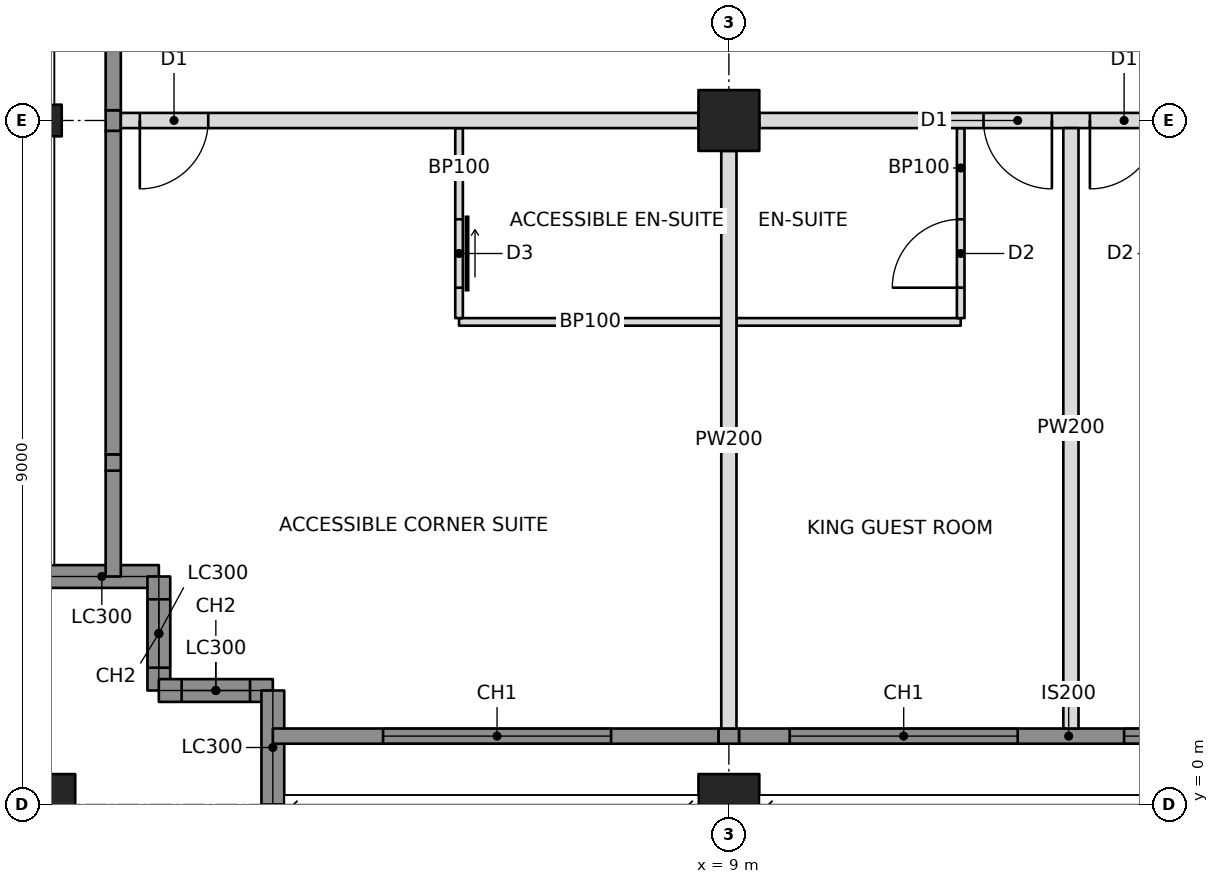
"""IFC4 building model, lengths in metres.
Left out: names, types, materials, properties, quantities, classifications, styles, units other than length and angle.
Written with IfcOpenShell. Run it as: python <this file> out.ifc"""

import sys

from ifc_helpers import new_model, si_unit, direction, frame, frame_2d, origin, origin_with_axes, origin_2d, place, context, subcontext, project, spatial, rectangle, hollow_rectangle, i_section, extrude, element, fill, save


model = new_model("IFC4")
c1 = context("Model", 3, precision=1e-05, world=origin(), true_north=direction((0.0, 1.0)))
c2 = subcontext(c1, "Body", "Model", "MODEL_VIEW")
j1 = project(units=[si_unit("LENGTHUNIT", "METRE"), si_unit("PLANEANGLEUNIT", "RADIAN")], contexts=[c1])
p1 = place(None, origin())
s1 = spatial("IfcSite", under=j1, at=p1, CompositionType="ELEMENT")
p2 = place(p1, origin())
s2 = spatial("IfcBuilding", under=s1, at=p2, CompositionType="ELEMENT")
p3 = place(p2, frame((0.0, 0.0, 255.4)))
s3 = spatial("IfcBuildingStorey", under=s2, at=p3, CompositionType="ELEMENT", Elevation=255.4)
p4 = place(p3, origin_with_axes())
e1 = element("IfcColumn", 1, at=p4, inside=s3, PredefinedType="COLUMN", context=c2, shape_type="SweptSolid", body=[
    extrude(hollow_rectangle(XDim=0.8, YDim=0.8, WallThickness=0.032, at=origin_2d()), origin(), (0.0, 0.0, 1.0), 3.6),
])
p5 = place(p3, frame((0.0, 9.0, 0.0), z_axis=(0.0, 0.0, 1.0), x_axis=(0.0, 1.0, 0.0)))
e2 = element("IfcColumn", 2, at=p5, inside=s3, PredefinedType="COLUMN", context=c2, shape_type="SweptSolid", body=[
    extrude(i_section(OverallWidth=0.417, OverallDepth=0.445, WebThickness=0.039, FlangeThickness=0.063, at=origin_2d()), origin(), (0.0, 0.0, 1.0), 3.6),
])
for number, where, z_axis, x_axis in (
    (3, (9.0, 0.0, 0.0), (0.0, 0.0, 1.0), (1.0, 0.0, 0.0)),
    (4, (9.0, 9.0, 0.0), (0.0, 0.0, 1.0), (1.0, 0.0, 0.0)),
):
    element("IfcColumn", number, at=place(p3, frame(where, z_axis=z_axis, x_axis=x_axis)), inside=s3, PredefinedType="COLUMN", context=c2, shape_type="SweptSolid", body=[
        extrude(hollow_rectangle(XDim=0.8, YDim=0.8, WallThickness=0.032, at=origin_2d()), origin(), (0.0, 0.0, 1.0), 3.6),
    ])
p6 = place(p3, frame((0.0, 3.0, 0.0), z_axis=(0.0, 0.0, 1.0), x_axis=(1.0, 0.0, 0.0)))
e5 = element("IfcWall", 5, at=p6, inside=s3, PredefinedType="SOLIDWALL", context=c2, shape_type="SweptSolid", body=[
    extrude(rectangle(XDim=1.5, YDim=0.3, at=frame_2d((0.75, 0.0))), origin(), (0.0, 0.0, 1.0), 2.62),
])
p7 = place(p3, frame((1.5, 3.0, 0.0), z_axis=(0.0, 0.0, 1.0), x_axis=(0.0, -1.0, 0.0)))
e6 = element("IfcWall", 6, at=p7, inside=s3, PredefinedType="SOLIDWALL", context=c2, shape_type="SweptSolid", body=[
    extrude(rectangle(XDim=1.5, YDim=0.3, at=frame_2d((0.75, 0.0))), origin(), (0.0, 0.0, 1.0), 3.4),
])
p8 = place(p7, frame((0.3, 0.0, 0.6)))
e7 = element("IfcOpeningElement", 7, at=p8, cuts=e6, PredefinedType="OPENING", context=c2, shape_type="SweptSolid", body=[
    extrude(rectangle(XDim=0.9, YDim=2.2, at=frame_2d((0.45, 1.1))), frame((0.0, 0.16, 0.0), z_axis=(0.0, -1.0, 0.0), x_axis=(1.0, 0.0, 0.0)), (0.0, 0.0, 1.0), 0.32),
])
p9 = place(p3, frame((1.5, 1.5, 0.0), z_axis=(0.0, 0.0, 1.0), x_axis=(1.0, 0.0, 0.0)))
e8 = element("IfcWall", 8, at=p9, inside=s3, PredefinedType="SOLIDWALL", context=c2, shape_type="SweptSolid", body=[
    extrude(rectangle(XDim=1.5, YDim=0.3, at=frame_2d((0.75, 0.0))), origin(), (0.0, 0.0, 1.0), 3.4),
])
p10 = place(p9, frame((0.3, 0.0, 0.6)))
e9 = element("IfcOpeningElement", 9, at=p10, cuts=e8, PredefinedType="OPENING", context=c2, shape_type="SweptSolid", body=[
    extrude(rectangle(XDim=0.9, YDim=2.2, at=frame_2d((0.45, 1.1))), frame((0.0, 0.16, 0.0), z_axis=(0.0, -1.0, 0.0), x_axis=(1.0, 0.0, 0.0)), (0.0, 0.0, 1.0), 0.32),
])
p11 = place(p3, frame((3.0, 1.5, 0.0), z_axis=(0.0, 0.0, 1.0), x_axis=(0.0, -1.0, 0.0)))
e10 = element("IfcWall", 10, at=p11, inside=s3, PredefinedType="SOLIDWALL", context=c2, shape_type="SweptSolid", body=[
    extrude(rectangle(XDim=1.5, YDim=0.3, at=frame_2d((0.75, 0.0))), origin(), (0.0, 0.0, 1.0), 2.62),
])
p12 = place(p3, frame((3.0, 0.9, 0.0), z_axis=(0.0, 0.0, 1.0), x_axis=(1.0, 0.0, 0.0)))
e11 = element("IfcWall", 11, at=p12, inside=s3, PredefinedType="SOLIDWALL", context=c2, shape_type="SweptSolid", body=[
    extrude(rectangle(XDim=5.865, YDim=0.2, at=frame_2d((2.932, 0.0))), origin(), (0.0, 0.0, 1.0), 3.4),
])
p13 = place(p12, frame((1.45, 0.0, 0.6)))
e12 = element("IfcOpeningElement", 12, at=p13, cuts=e11, PredefinedType="OPENING", context=c2, shape_type="SweptSolid", body=[
    extrude(rectangle(XDim=3.0, YDim=2.2, at=frame_2d((1.5, 1.1))), frame((0.0, 0.11, 0.0), z_axis=(0.0, -1.0, 0.0), x_axis=(1.0, 0.0, 0.0)), (0.0, 0.0, 1.0), 0.22),
])
p14 = place(p3, frame((0.9, 3.0, 0.0), z_axis=(0.0, 0.0, 1.0), x_axis=(0.0, 1.0, 0.0)))
e13 = element("IfcWall", 13, at=p14, inside=s3, PredefinedType="SOLIDWALL", context=c2, shape_type="SweptSolid", body=[
    extrude(rectangle(XDim=1.393, YDim=0.2, at=frame_2d((0.696, 0.0))), origin(), (0.0, 0.0, 1.0), 3.4),
])
p15 = place(p3, frame((1.0, 9.0, 0.0), z_axis=(0.0, 0.0, 1.0), x_axis=(1.0, 0.0, 0.0)))
e14 = element("IfcWall", 14, at=p15, inside=s3, PredefinedType="PARTITIONING", context=c2, shape_type="SweptSolid", body=[
    extrude(rectangle(XDim=7.6, YDim=0.2, at=frame_2d((3.8, 0.0))), origin(), (0.0, 0.0, 1.0), 2.638),
])
p16 = place(p15, frame((0.25, 0.0, 0.0)))
e15 = element("IfcOpeningElement", 15, at=p16, cuts=e14, PredefinedType="OPENING", context=c2, shape_type="SweptSolid", body=[
    extrude(rectangle(XDim=0.9, YDim=2.1, at=frame_2d((0.45, 1.05))), frame((0.0, 0.11, 0.0), z_axis=(0.0, -1.0, 0.0), x_axis=(1.0, 0.0, 0.0)), (0.0, 0.0, 1.0), 0.22),
])
p17 = place(p3, frame((9.4, 9.0, 0.0), z_axis=(0.0, 0.0, 1.0), x_axis=(1.0, 0.0, 0.0)))
e16 = element("IfcWall", 16, at=p17, inside=s3, PredefinedType="PARTITIONING", context=c2, shape_type="SweptSolid", body=[
    extrude(rectangle(XDim=8.2, YDim=0.2, at=frame_2d((4.1, 0.0))), origin(), (0.0, 0.0, 1.0), 2.605),
])
p18 = place(p17, frame((2.95, 0.0, 0.0)))
e17 = element("IfcOpeningElement", 17, at=p18, cuts=e16, PredefinedType="OPENING", context=c2, shape_type="SweptSolid", body=[
    extrude(rectangle(XDim=0.9, YDim=2.1, at=frame_2d((0.45, 1.05))), frame((0.0, 0.11, 0.0), z_axis=(0.0, -1.0, 0.0), x_axis=(1.0, 0.0, 0.0)), (0.0, 0.0, 1.0), 0.22),
])
p19 = place(p17, frame((4.35, 0.0, 0.0)))
e18 = element("IfcOpeningElement", 18, at=p19, cuts=e16, PredefinedType="OPENING", context=c2, shape_type="SweptSolid", body=[
    extrude(rectangle(XDim=0.9, YDim=2.1, at=frame_2d((0.45, 1.05))), frame((0.0, 0.11, 0.0), z_axis=(0.0, -1.0, 0.0), x_axis=(1.0, 0.0, 0.0)), (0.0, 0.0, 1.0), 0.22),
])
p20 = place(p3, frame((9.0, 8.6, 0.0), z_axis=(0.0, 0.0, 1.0), x_axis=(0.0, -1.0, 0.0)))
e19 = element("IfcWall", 19, at=p20, inside=s3, PredefinedType="PARTITIONING", context=c2, shape_type="SweptSolid", body=[
    extrude(rectangle(XDim=7.6, YDim=0.2, at=frame_2d((3.8, 0.0))), origin(), (0.0, 0.0, 1.0), 2.638),
])
p21 = place(p3, frame((13.5, 8.9, 0.0), z_axis=(0.0, 0.0, 1.0), x_axis=(0.0, -1.0, 0.0)))
e20 = element("IfcWall", 20, at=p21, inside=s3, PredefinedType="PARTITIONING", context=c2, shape_type="SweptSolid", body=[
    extrude(rectangle(XDim=7.9, YDim=0.2, at=frame_2d((3.95, 0.0))), origin(), (0.0, 0.0, 1.0), 2.604),
])
p22 = place(p3, frame((5.45, 6.35, 0.0), z_axis=(0.0, 0.0, 1.0), x_axis=(1.0, 0.0, 0.0)))
e21 = element("IfcWall", 21, at=p22, inside=s3, PredefinedType="PARTITIONING", context=c2, shape_type="SweptSolid", body=[
    extrude(rectangle(XDim=3.45, YDim=0.1, at=frame_2d((1.725, 0.0))), origin(), (0.0, 0.0, 1.0), 2.638),
])
p23 = place(p3, frame((5.45, 8.9, 0.0), z_axis=(0.0, 0.0, 1.0), x_axis=(0.0, -1.0, 0.0)))
e22 = element("IfcWall", 22, at=p23, inside=s3, PredefinedType="PARTITIONING", context=c2, shape_type="SweptSolid", body=[
    extrude(rectangle(XDim=2.5, YDim=0.1, at=frame_2d((1.25, 0.0))), origin(), (0.0, 0.0, 1.0), 2.638),
])
p24 = place(p23, frame((1.2, 0.0, 0.0)))
e23 = element("IfcOpeningElement", 23, at=p24, cuts=e22, PredefinedType="OPENING", context=c2, shape_type="SweptSolid", body=[
    extrude(rectangle(XDim=0.9, YDim=2.1, at=frame_2d((0.45, 1.05))), frame((0.0, 0.06, 0.0), z_axis=(0.0, -1.0, 0.0), x_axis=(1.0, 0.0, 0.0)), (0.0, 0.0, 1.0), 0.12),
])
p25 = place(p3, frame((9.1, 6.35, 0.0), z_axis=(0.0, 0.0, 1.0), x_axis=(1.0, 0.0, 0.0)))
e24 = element("IfcWall", 24, at=p25, inside=s3, PredefinedType="PARTITIONING", context=c2, shape_type="SweptSolid", body=[
    extrude(rectangle(XDim=2.95, YDim=0.1, at=frame_2d((1.475, 0.0))), origin(), (0.0, 0.0, 1.0), 2.638),
])
p26 = place(p3, frame((12.05, 8.9, 0.0), z_axis=(0.0, 0.0, 1.0), x_axis=(0.0, -1.0, 0.0)))
e25 = element("IfcWall", 25, at=p26, inside=s3, PredefinedType="PARTITIONING", context=c2, shape_type="SweptSolid", body=[
    extrude(rectangle(XDim=2.5, YDim=0.1, at=frame_2d((1.25, 0.0))), origin(), (0.0, 0.0, 1.0), 2.604),
])
p27 = place(p26, frame((1.2, 0.0, 0.0)))
e26 = element("IfcOpeningElement", 26, at=p27, cuts=e25, PredefinedType="OPENING", context=c2, shape_type="SweptSolid", body=[
    extrude(rectangle(XDim=0.9, YDim=2.1, at=frame_2d((0.45, 1.05))), frame((0.0, 0.06, 0.0), z_axis=(0.0, -1.0, 0.0), x_axis=(1.0, 0.0, 0.0)), (0.0, 0.0, 1.0), 0.12),
])
p28 = place(p3, frame((8.865, 0.9, 0.0), z_axis=(0.0, 0.0, 1.0), x_axis=(1.0, 0.0, 0.0)))
e27 = element("IfcWall", 27, at=p28, inside=s3, PredefinedType="SOLIDWALL", context=c2, shape_type="SweptSolid", body=[
    extrude(rectangle(XDim=0.271, YDim=0.2, at=frame_2d((0.135, 0.0))), origin(), (0.0, 0.0, 1.0), 2.638),
])
p29 = place(p3, frame((9.135, 0.9, 0.0), z_axis=(0.0, 0.0, 1.0), x_axis=(1.0, 0.0, 0.0)))
e28 = element("IfcWall", 28, at=p29, inside=s3, PredefinedType="SOLIDWALL", context=c2, shape_type="SweptSolid", body=[
    extrude(rectangle(XDim=8.671, YDim=0.2, at=frame_2d((4.335, 0.0))), origin(), (0.0, 0.0, 1.0), 3.4),
])
p30 = place(p29, frame((0.665, 0.0, 0.6)))
e29 = element("IfcOpeningElement", 29, at=p30, cuts=e28, PredefinedType="OPENING", context=c2, shape_type="SweptSolid", body=[
    extrude(rectangle(XDim=3.0, YDim=2.2, at=frame_2d((1.5, 1.1))), frame((0.0, 0.11, 0.0), z_axis=(0.0, -1.0, 0.0), x_axis=(1.0, 0.0, 0.0)), (0.0, 0.0, 1.0), 0.22),
])
p31 = place(p29, frame((5.065, 0.0, 0.6)))
e30 = element("IfcOpeningElement", 30, at=p31, cuts=e28, PredefinedType="OPENING", context=c2, shape_type="SweptSolid", body=[
    extrude(rectangle(XDim=3.0, YDim=2.2, at=frame_2d((1.5, 1.1))), frame((0.0, 0.11, 0.0), z_axis=(0.0, -1.0, 0.0), x_axis=(1.0, 0.0, 0.0)), (0.0, 0.0, 1.0), 0.22),
])
p32 = place(p3, frame((0.9, 4.393, 0.0), z_axis=(0.0, 0.0, 1.0), x_axis=(0.0, 1.0, 0.0)))
e31 = element("IfcWall", 31, at=p32, inside=s3, PredefinedType="SOLIDWALL", context=c2, shape_type="SweptSolid", body=[
    extrude(rectangle(XDim=0.215, YDim=0.2, at=frame_2d((0.107, 0.0))), origin(), (0.0, 0.0, 1.0), 2.861),
])
p33 = place(p3, frame((0.9, 4.607, 0.0), z_axis=(0.0, 0.0, 1.0), x_axis=(0.0, 1.0, 0.0)))
e32 = element("IfcWall", 32, at=p33, inside=s3, PredefinedType="SOLIDWALL", context=c2, shape_type="SweptSolid", body=[
    extrude(rectangle(XDim=4.257, YDim=0.2, at=frame_2d((2.129, 0.0))), origin(), (0.0, 0.0, 1.0), 3.4),
])
p34 = place(p3, frame((0.9, 8.865, 0.0), z_axis=(0.0, 0.0, 1.0), x_axis=(0.0, 1.0, 0.0)))
e33 = element("IfcWall", 33, at=p34, inside=s3, PredefinedType="SOLIDWALL", context=c2, shape_type="SweptSolid", body=[
    extrude(rectangle(XDim=0.271, YDim=0.2, at=frame_2d((0.135, 0.0))), origin(), (0.0, 0.0, 1.0), 2.638),
])
p35 = place(p3, frame((0.9, 9.135, 0.0), z_axis=(0.0, 0.0, 1.0), x_axis=(0.0, 1.0, 0.0)))
e34 = element("IfcWall", 34, at=p35, inside=s3, PredefinedType="SOLIDWALL", context=c2, shape_type="SweptSolid", body=[
    extrude(rectangle(XDim=8.671, YDim=0.2, at=frame_2d((4.335, 0.0))), origin(), (0.0, 0.0, 1.0), 3.4),
])
p36 = place(p35, frame((2.015, 0.0, 0.6)))
e35 = element("IfcOpeningElement", 35, at=p36, cuts=e34, PredefinedType="OPENING", context=c2, shape_type="SweptSolid", body=[
    extrude(rectangle(XDim=3.0, YDim=2.2, at=frame_2d((1.5, 1.1))), frame((0.0, 0.11, 0.0), z_axis=(0.0, -1.0, 0.0), x_axis=(1.0, 0.0, 0.0)), (0.0, 0.0, 1.0), 0.22),
])
p37 = place(p35, frame((5.515, 0.0, 0.6)))
e36 = element("IfcOpeningElement", 36, at=p37, cuts=e34, PredefinedType="OPENING", context=c2, shape_type="SweptSolid", body=[
    extrude(rectangle(XDim=3.0, YDim=2.2, at=frame_2d((1.5, 1.1))), frame((0.0, 0.11, 0.0), z_axis=(0.0, -1.0, 0.0), x_axis=(1.0, 0.0, 0.0)), (0.0, 0.0, 1.0), 0.22),
])
p38 = place(p8, origin())
e37 = element("IfcWindow", 37, at=p38, inside=s3, PartitioningType="SINGLE_PANEL", PredefinedType="WINDOW", context=c2, shape_type="SweptSolid", body=[
    extrude(rectangle(XDim=0.9, YDim=2.2, at=frame_2d((0.45, 1.1))), frame((0.0, 0.03, 0.0), z_axis=(0.0, -1.0, 0.0), x_axis=(1.0, 0.0, 0.0)), (0.0, 0.0, 1.0), 0.06),
])
fill(e7, e37)
p39 = place(p10, origin())
e38 = element("IfcWindow", 38, at=p39, inside=s3, PartitioningType="SINGLE_PANEL", PredefinedType="WINDOW", context=c2, shape_type="SweptSolid", body=[
    extrude(rectangle(XDim=0.9, YDim=2.2, at=frame_2d((0.45, 1.1))), frame((0.0, 0.03, 0.0), z_axis=(0.0, -1.0, 0.0), x_axis=(1.0, 0.0, 0.0)), (0.0, 0.0, 1.0), 0.06),
])
fill(e9, e38)
p40 = place(p13, origin())
e39 = element("IfcWindow", 39, at=p40, inside=s3, PartitioningType="TRIPLE_PANEL_VERTICAL", PredefinedType="WINDOW", context=c2, shape_type="SweptSolid", body=[
    extrude(rectangle(XDim=3.0, YDim=2.2, at=frame_2d((1.5, 1.1))), frame((0.0, 0.03, 0.0), z_axis=(0.0, -1.0, 0.0), x_axis=(1.0, 0.0, 0.0)), (0.0, 0.0, 1.0), 0.06),
])
fill(e12, e39)
p41 = place(p30, origin())
e40 = element("IfcWindow", 40, at=p41, inside=s3, PartitioningType="TRIPLE_PANEL_VERTICAL", PredefinedType="WINDOW", context=c2, shape_type="SweptSolid", body=[
    extrude(rectangle(XDim=3.0, YDim=2.2, at=frame_2d((1.5, 1.1))), frame((0.0, 0.03, 0.0), z_axis=(0.0, -1.0, 0.0), x_axis=(1.0, 0.0, 0.0)), (0.0, 0.0, 1.0), 0.06),
])
fill(e29, e40)
p42 = place(p31, origin())
e41 = element("IfcWindow", 41, at=p42, inside=s3, PartitioningType="TRIPLE_PANEL_VERTICAL", PredefinedType="WINDOW", context=c2, shape_type="SweptSolid", body=[
    extrude(rectangle(XDim=3.0, YDim=2.2, at=frame_2d((1.5, 1.1))), frame((0.0, 0.03, 0.0), z_axis=(0.0, -1.0, 0.0), x_axis=(1.0, 0.0, 0.0)), (0.0, 0.0, 1.0), 0.06),
])
fill(e30, e41)
p43 = place(p24, origin())
e42 = element("IfcDoor", 42, at=p43, inside=s3, OperationType="SLIDING_TO_LEFT", PredefinedType="DOOR", context=c2, shape_type="SweptSolid", body=[
    extrude(rectangle(XDim=0.9, YDim=2.1, at=frame_2d((0.45, 1.05))), frame((0.0, 0.025, 0.0), z_axis=(0.0, -1.0, 0.0), x_axis=(1.0, 0.0, 0.0)), (0.0, 0.0, 1.0), 0.05),
])
fill(e23, e42)
p44 = place(p16, frame((0.9, 0.0, 0.0), z_axis=(0.0, 0.0, 1.0), x_axis=(-1.0, 0.0, 0.0)))
e43 = element("IfcDoor", 43, at=p44, inside=s3, OperationType="SINGLE_SWING_RIGHT", PredefinedType="DOOR", context=c2, shape_type="SweptSolid", body=[
    extrude(rectangle(XDim=0.9, YDim=2.1, at=frame_2d((0.45, 1.05))), frame((0.0, 0.025, 0.0), z_axis=(0.0, -1.0, 0.0), x_axis=(1.0, 0.0, 0.0)), (0.0, 0.0, 1.0), 0.05),
])
fill(e15, e43)
p45 = place(p27, frame((0.9, 0.0, 0.0), z_axis=(0.0, 0.0, 1.0), x_axis=(-1.0, 0.0, 0.0)))
e44 = element("IfcDoor", 44, at=p45, inside=s3, OperationType="SINGLE_SWING_LEFT", PredefinedType="DOOR", context=c2, shape_type="SweptSolid", body=[
    extrude(rectangle(XDim=0.9, YDim=2.1, at=frame_2d((0.45, 1.05))), frame((0.0, 0.025, 0.0), z_axis=(0.0, -1.0, 0.0), x_axis=(1.0, 0.0, 0.0)), (0.0, 0.0, 1.0), 0.05),
])
fill(e26, e44)
p46 = place(p18, frame((0.9, 0.0, 0.0), z_axis=(0.0, 0.0, 1.0), x_axis=(-1.0, 0.0, 0.0)))
e45 = element("IfcDoor", 45, at=p46, inside=s3, OperationType="SINGLE_SWING_LEFT", PredefinedType="DOOR", context=c2, shape_type="SweptSolid", body=[
    extrude(rectangle(XDim=0.9, YDim=2.1, at=frame_2d((0.45, 1.05))), frame((0.0, 0.025, 0.0), z_axis=(0.0, -1.0, 0.0), x_axis=(1.0, 0.0, 0.0)), (0.0, 0.0, 1.0), 0.05),
])
fill(e17, e45)
p47 = place(p19, frame((0.9, 0.0, 0.0), z_axis=(0.0, 0.0, 1.0), x_axis=(-1.0, 0.0, 0.0)))
e46 = element("IfcDoor", 46, at=p47, inside=s3, OperationType="SINGLE_SWING_RIGHT", PredefinedType="DOOR", context=c2, shape_type="SweptSolid", body=[
    extrude(rectangle(XDim=0.9, YDim=2.1, at=frame_2d((0.45, 1.05))), frame((0.0, 0.025, 0.0), z_axis=(0.0, -1.0, 0.0), x_axis=(1.0, 0.0, 0.0)), (0.0, 0.0, 1.0), 0.05),
])
fill(e18, e46)
save(model, sys.argv[1])
